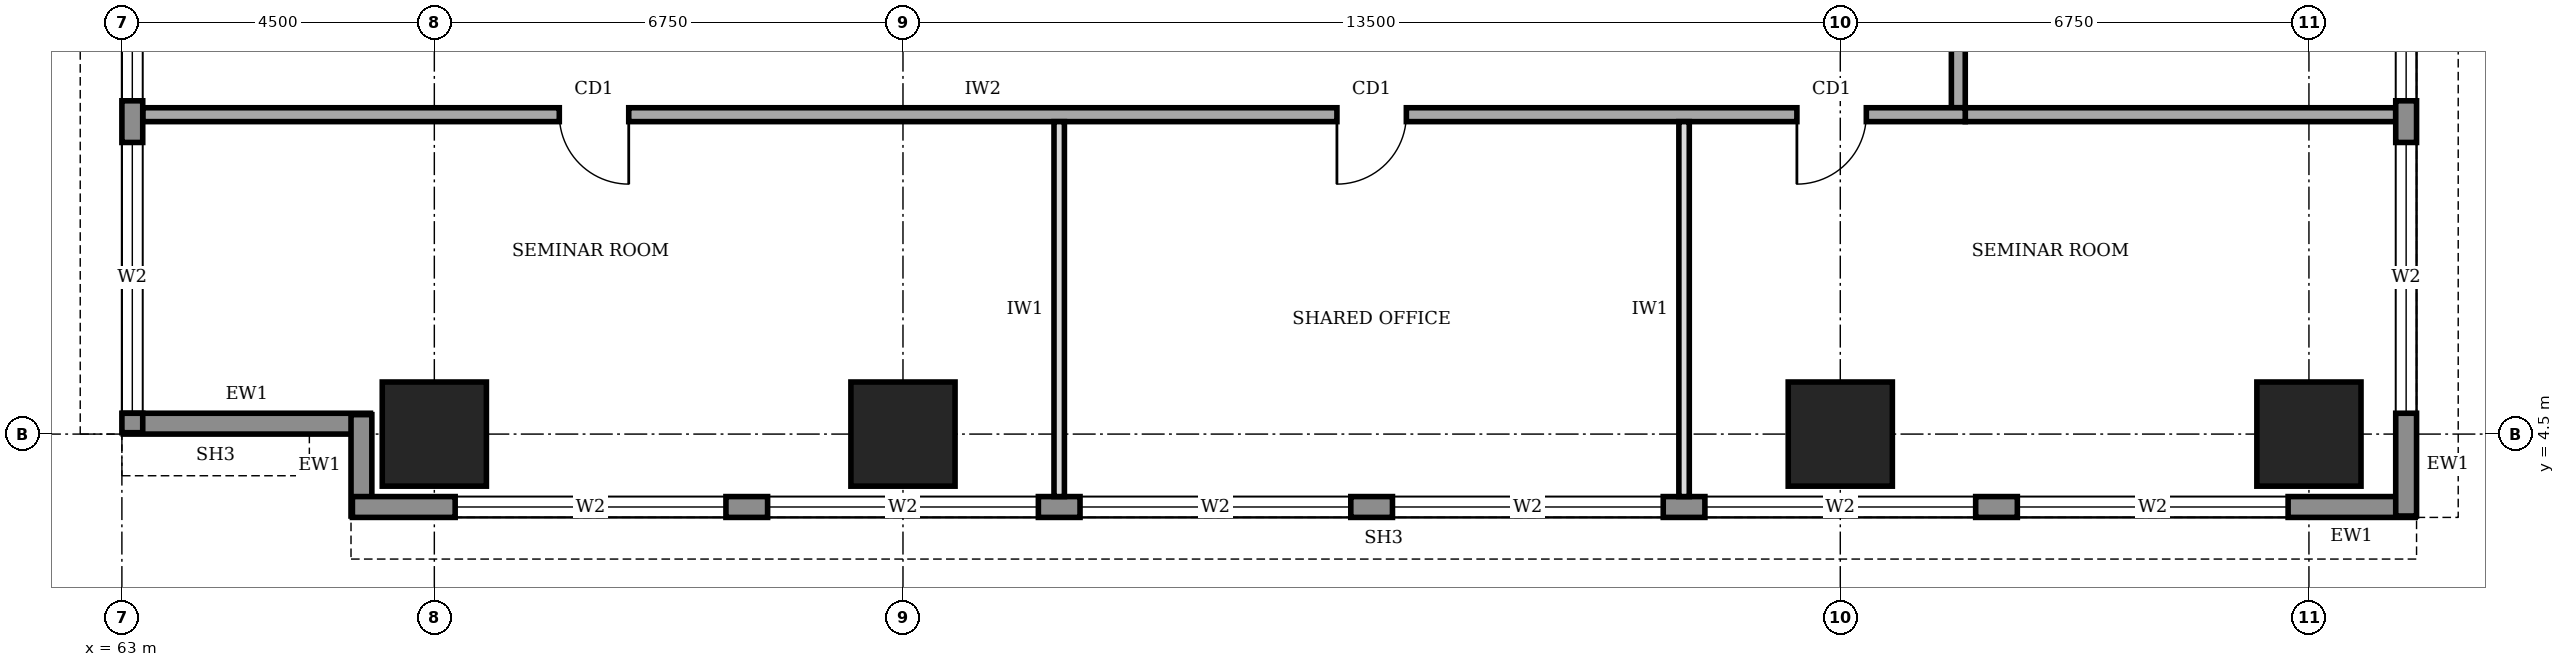
"""IFC4 building model, lengths in metres.
Left out: names, types, materials, properties, quantities, classifications, styles, units other than length and angle.
Written with IfcOpenShell. Run it as: python <this file> out.ifc"""

import sys

from ifc_helpers import new_model, si_unit, direction, frame, frame_2d, origin, origin_2d, place, context, subcontext, project, spatial, rectangle, extrude, element, fill, save


model = new_model("IFC4")
c1 = context("Model", 3, precision=1e-05, world=origin(), true_north=direction((0.0, 1.0)))
c2 = subcontext(c1, "Body", "Model", "MODEL_VIEW")
j1 = project(units=[si_unit("LENGTHUNIT", "METRE"), si_unit("PLANEANGLEUNIT", "RADIAN")], contexts=[c1])
p1 = place(None, origin())
s1 = spatial("IfcSite", under=j1, at=p1, CompositionType="ELEMENT")
p2 = place(p1, origin())
s2 = spatial("IfcBuilding", under=s1, at=p2, CompositionType="ELEMENT")
p3 = place(p2, frame((0.0, 0.0, 141.0)))
s3 = spatial("IfcBuildingStorey", under=s2, at=p3, CompositionType="ELEMENT", Elevation=141.0)
for number, where, z_axis, x_axis in (
    (1, (67.5, 4.5, 0.0), (0.0, 0.0, 1.0), (1.0, 0.0, 0.0)),
    (2, (74.25, 4.5, 0.0), (0.0, 0.0, 1.0), (1.0, 0.0, 0.0)),
    (3, (87.75, 4.5, 0.0), (0.0, 0.0, 1.0), (1.0, 0.0, 0.0)),
    (4, (94.5, 4.5, 0.0), (0.0, 0.0, 1.0), (1.0, 0.0, 0.0)),
):
    element("IfcColumn", number, at=place(p3, frame(where, z_axis=z_axis, x_axis=x_axis)), inside=s3, PredefinedType="COLUMN", context=c2, shape_type="SweptSolid", body=[
        extrude(rectangle(XDim=1.5, YDim=1.5, at=origin_2d()), origin(), (0.0, 0.0, 1.0), 4.0),
    ])
p4 = place(p3, frame((63.02, 4.65, 0.0), z_axis=(0.0, 0.0, 1.0), x_axis=(1.0, 0.0, 0.0)))
e5 = element("IfcWall", 5, at=p4, inside=s3, PredefinedType="STANDARD", context=c2, shape_type="SweptSolid", body=[
    extrude(rectangle(XDim=3.56, YDim=0.3, at=frame_2d((1.78, 0.0))), origin(), (0.0, 0.0, 1.0), 2.85),
])
p5 = place(p3, frame((66.45, 4.78, 0.0), z_axis=(0.0, 0.0, 1.0), x_axis=(0.0, -1.0, 0.0)))
e6 = element("IfcWall", 6, at=p5, inside=s3, PredefinedType="STANDARD", context=c2, shape_type="SweptSolid", body=[
    extrude(rectangle(XDim=1.46, YDim=0.3, at=frame_2d((0.73, 0.0))), origin(), (0.0, 0.0, 1.0), 3.75),
])
p6 = place(p3, frame((66.32, 3.45, 0.0), z_axis=(0.0, 0.0, 1.0), x_axis=(1.0, 0.0, 0.0)))
e7 = element("IfcWall", 7, at=p6, inside=s3, PredefinedType="STANDARD", context=c2, shape_type="SweptSolid", body=[
    extrude(rectangle(XDim=29.71, YDim=0.3, at=frame_2d((14.855, 0.0))), origin(), (0.0, 0.0, 1.0), 3.75),
])
p7 = place(p6, frame((1.48, 0.0, 0.6)))
e8 = element("IfcOpeningElement", 8, at=p7, cuts=e7, PredefinedType="OPENING", context=c2, shape_type="SweptSolid", body=[
    extrude(rectangle(XDim=3.9, YDim=2.6, at=frame_2d((1.95, 1.3))), frame((0.0, 0.16, 0.0), z_axis=(0.0, -1.0, 0.0), x_axis=(1.0, 0.0, 0.0)), (0.0, 0.0, 1.0), 0.32),
])
p8 = place(p6, frame((5.98, 0.0, 0.6)))
e9 = element("IfcOpeningElement", 9, at=p8, cuts=e7, PredefinedType="OPENING", context=c2, shape_type="SweptSolid", body=[
    extrude(rectangle(XDim=3.9, YDim=2.6, at=frame_2d((1.95, 1.3))), frame((0.0, 0.16, 0.0), z_axis=(0.0, -1.0, 0.0), x_axis=(1.0, 0.0, 0.0)), (0.0, 0.0, 1.0), 0.32),
])
p9 = place(p6, frame((10.48, 0.0, 0.6)))
e10 = element("IfcOpeningElement", 10, at=p9, cuts=e7, PredefinedType="OPENING", context=c2, shape_type="SweptSolid", body=[
    extrude(rectangle(XDim=3.9, YDim=2.6, at=frame_2d((1.95, 1.3))), frame((0.0, 0.16, 0.0), z_axis=(0.0, -1.0, 0.0), x_axis=(1.0, 0.0, 0.0)), (0.0, 0.0, 1.0), 0.32),
])
p10 = place(p6, frame((14.98, 0.0, 0.6)))
e11 = element("IfcOpeningElement", 11, at=p10, cuts=e7, PredefinedType="OPENING", context=c2, shape_type="SweptSolid", body=[
    extrude(rectangle(XDim=3.9, YDim=2.6, at=frame_2d((1.95, 1.3))), frame((0.0, 0.16, 0.0), z_axis=(0.0, -1.0, 0.0), x_axis=(1.0, 0.0, 0.0)), (0.0, 0.0, 1.0), 0.32),
])
p11 = place(p6, frame((19.48, 0.0, 0.6)))
e12 = element("IfcOpeningElement", 12, at=p11, cuts=e7, PredefinedType="OPENING", context=c2, shape_type="SweptSolid", body=[
    extrude(rectangle(XDim=3.9, YDim=2.6, at=frame_2d((1.95, 1.3))), frame((0.0, 0.16, 0.0), z_axis=(0.0, -1.0, 0.0), x_axis=(1.0, 0.0, 0.0)), (0.0, 0.0, 1.0), 0.32),
])
p12 = place(p6, frame((23.98, 0.0, 0.6)))
e13 = element("IfcOpeningElement", 13, at=p12, cuts=e7, PredefinedType="OPENING", context=c2, shape_type="SweptSolid", body=[
    extrude(rectangle(XDim=3.9, YDim=2.6, at=frame_2d((1.95, 1.3))), frame((0.0, 0.16, 0.0), z_axis=(0.0, -1.0, 0.0), x_axis=(1.0, 0.0, 0.0)), (0.0, 0.0, 1.0), 0.32),
])
p13 = place(p3, frame((95.9, 3.32, 0.0), z_axis=(0.0, 0.0, 1.0), x_axis=(0.0, 1.0, 0.0)))
e14 = element("IfcWall", 14, at=p13, inside=s3, PredefinedType="STANDARD", context=c2, shape_type="SweptSolid", body=[
    extrude(rectangle(XDim=33.86, YDim=0.3, at=frame_2d((16.93, 0.0))), origin(), (0.0, 0.0, 1.0), 3.75),
])
p14 = place(p13, frame((1.48, 0.0, 0.6)))
e15 = element("IfcOpeningElement", 15, at=p14, cuts=e14, PredefinedType="OPENING", context=c2, shape_type="SweptSolid", body=[
    extrude(rectangle(XDim=3.9, YDim=2.6, at=frame_2d((1.95, 1.3))), frame((0.0, 0.16, 0.0), z_axis=(0.0, -1.0, 0.0), x_axis=(1.0, 0.0, 0.0)), (0.0, 0.0, 1.0), 0.32),
])
p15 = place(p13, frame((5.98, 0.0, 0.6)))
e16 = element("IfcOpeningElement", 16, at=p15, cuts=e14, PredefinedType="OPENING", context=c2, shape_type="SweptSolid", body=[
    extrude(rectangle(XDim=3.9, YDim=2.6, at=frame_2d((1.95, 1.3))), frame((0.0, 0.16, 0.0), z_axis=(0.0, -1.0, 0.0), x_axis=(1.0, 0.0, 0.0)), (0.0, 0.0, 1.0), 0.32),
])
p16 = place(p13, frame((10.48, 0.0, 0.6)))
e17 = element("IfcOpeningElement", 17, at=p16, cuts=e14, PredefinedType="OPENING", context=c2, shape_type="SweptSolid", body=[
    extrude(rectangle(XDim=3.9, YDim=2.6, at=frame_2d((1.95, 1.3))), frame((0.0, 0.16, 0.0), z_axis=(0.0, -1.0, 0.0), x_axis=(1.0, 0.0, 0.0)), (0.0, 0.0, 1.0), 0.32),
])
p17 = place(p13, frame((14.98, 0.0, 0.6)))
e18 = element("IfcOpeningElement", 18, at=p17, cuts=e14, PredefinedType="OPENING", context=c2, shape_type="SweptSolid", body=[
    extrude(rectangle(XDim=3.9, YDim=2.6, at=frame_2d((1.95, 1.3))), frame((0.0, 0.16, 0.0), z_axis=(0.0, -1.0, 0.0), x_axis=(1.0, 0.0, 0.0)), (0.0, 0.0, 1.0), 0.32),
])
p18 = place(p13, frame((19.48, 0.0, 0.6)))
e19 = element("IfcOpeningElement", 19, at=p18, cuts=e14, PredefinedType="OPENING", context=c2, shape_type="SweptSolid", body=[
    extrude(rectangle(XDim=3.9, YDim=2.6, at=frame_2d((1.95, 1.3))), frame((0.0, 0.16, 0.0), z_axis=(0.0, -1.0, 0.0), x_axis=(1.0, 0.0, 0.0)), (0.0, 0.0, 1.0), 0.32),
])
p19 = place(p13, frame((23.98, 0.0, 0.6)))
e20 = element("IfcOpeningElement", 20, at=p19, cuts=e14, PredefinedType="OPENING", context=c2, shape_type="SweptSolid", body=[
    extrude(rectangle(XDim=3.9, YDim=2.6, at=frame_2d((1.95, 1.3))), frame((0.0, 0.16, 0.0), z_axis=(0.0, -1.0, 0.0), x_axis=(1.0, 0.0, 0.0)), (0.0, 0.0, 1.0), 0.32),
])
p20 = place(p13, frame((28.48, 0.0, 0.6)))
e21 = element("IfcOpeningElement", 21, at=p20, cuts=e14, PredefinedType="OPENING", context=c2, shape_type="SweptSolid", body=[
    extrude(rectangle(XDim=3.9, YDim=2.6, at=frame_2d((1.95, 1.3))), frame((0.0, 0.16, 0.0), z_axis=(0.0, -1.0, 0.0), x_axis=(1.0, 0.0, 0.0)), (0.0, 0.0, 1.0), 0.32),
])
p21 = place(p3, frame((63.15, 35.98, 0.0), z_axis=(0.0, 0.0, 1.0), x_axis=(0.0, -1.0, 0.0)))
e22 = element("IfcWall", 22, at=p21, inside=s3, PredefinedType="STANDARD", context=c2, shape_type="SweptSolid", body=[
    extrude(rectangle(XDim=31.46, YDim=0.3, at=frame_2d((15.73, 0.0))), origin(), (0.0, 0.0, 1.0), 3.75),
])
p22 = place(p21, frame((27.28, 0.0, 0.6)))
e23 = element("IfcOpeningElement", 23, at=p22, cuts=e22, PredefinedType="OPENING", context=c2, shape_type="SweptSolid", body=[
    extrude(rectangle(XDim=3.9, YDim=2.6, at=frame_2d((1.95, 1.3))), frame((0.0, 0.16, 0.0), z_axis=(0.0, -1.0, 0.0), x_axis=(1.0, 0.0, 0.0)), (0.0, 0.0, 1.0), 0.32),
])
p23 = place(p21, frame((22.78, 0.0, 0.6)))
e24 = element("IfcOpeningElement", 24, at=p23, cuts=e22, PredefinedType="OPENING", context=c2, shape_type="SweptSolid", body=[
    extrude(rectangle(XDim=3.9, YDim=2.6, at=frame_2d((1.95, 1.3))), frame((0.0, 0.16, 0.0), z_axis=(0.0, -1.0, 0.0), x_axis=(1.0, 0.0, 0.0)), (0.0, 0.0, 1.0), 0.32),
])
p24 = place(p21, frame((18.28, 0.0, 0.6)))
e25 = element("IfcOpeningElement", 25, at=p24, cuts=e22, PredefinedType="OPENING", context=c2, shape_type="SweptSolid", body=[
    extrude(rectangle(XDim=3.9, YDim=2.6, at=frame_2d((1.95, 1.3))), frame((0.0, 0.16, 0.0), z_axis=(0.0, -1.0, 0.0), x_axis=(1.0, 0.0, 0.0)), (0.0, 0.0, 1.0), 0.32),
])
p25 = place(p21, frame((13.78, 0.0, 0.6)))
e26 = element("IfcOpeningElement", 26, at=p25, cuts=e22, PredefinedType="OPENING", context=c2, shape_type="SweptSolid", body=[
    extrude(rectangle(XDim=3.9, YDim=2.6, at=frame_2d((1.95, 1.3))), frame((0.0, 0.16, 0.0), z_axis=(0.0, -1.0, 0.0), x_axis=(1.0, 0.0, 0.0)), (0.0, 0.0, 1.0), 0.32),
])
p26 = place(p21, frame((9.28, 0.0, 0.6)))
e27 = element("IfcOpeningElement", 27, at=p26, cuts=e22, PredefinedType="OPENING", context=c2, shape_type="SweptSolid", body=[
    extrude(rectangle(XDim=3.9, YDim=2.6, at=frame_2d((1.95, 1.3))), frame((0.0, 0.16, 0.0), z_axis=(0.0, -1.0, 0.0), x_axis=(1.0, 0.0, 0.0)), (0.0, 0.0, 1.0), 0.32),
])
p27 = place(p21, frame((4.78, 0.0, 0.6)))
e28 = element("IfcOpeningElement", 28, at=p27, cuts=e22, PredefinedType="OPENING", context=c2, shape_type="SweptSolid", body=[
    extrude(rectangle(XDim=3.9, YDim=2.6, at=frame_2d((1.95, 1.3))), frame((0.0, 0.16, 0.0), z_axis=(0.0, -1.0, 0.0), x_axis=(1.0, 0.0, 0.0)), (0.0, 0.0, 1.0), 0.32),
])
p28 = place(p3, frame((63.3, 9.1, 0.0), z_axis=(0.0, 0.0, 1.0), x_axis=(1.0, 0.0, 0.0)))
e29 = element("IfcWall", 29, at=p28, inside=s3, PredefinedType="SOLIDWALL", context=c2, shape_type="SweptSolid", body=[
    extrude(rectangle(XDim=26.25, YDim=0.2, at=frame_2d((13.125, 0.0))), origin(), (0.0, 0.0, 1.0), 3.75),
])
p29 = place(p28, frame((6.0, 0.0, 0.0)))
e30 = element("IfcOpeningElement", 30, at=p29, cuts=e29, PredefinedType="OPENING", context=c2, shape_type="SweptSolid", body=[
    extrude(rectangle(XDim=1.0, YDim=2.1, at=frame_2d((0.5, 1.05))), frame((0.0, 0.11, 0.0), z_axis=(0.0, -1.0, 0.0), x_axis=(1.0, 0.0, 0.0)), (0.0, 0.0, 1.0), 0.22),
])
p30 = place(p28, frame((17.2, 0.0, 0.0)))
e31 = element("IfcOpeningElement", 31, at=p30, cuts=e29, PredefinedType="OPENING", context=c2, shape_type="SweptSolid", body=[
    extrude(rectangle(XDim=1.0, YDim=2.1, at=frame_2d((0.5, 1.05))), frame((0.0, 0.11, 0.0), z_axis=(0.0, -1.0, 0.0), x_axis=(1.0, 0.0, 0.0)), (0.0, 0.0, 1.0), 0.22),
])
p31 = place(p28, frame((23.825, 0.0, 0.0)))
e32 = element("IfcOpeningElement", 32, at=p31, cuts=e29, PredefinedType="OPENING", context=c2, shape_type="SweptSolid", body=[
    extrude(rectangle(XDim=1.0, YDim=2.1, at=frame_2d((0.5, 1.05))), frame((0.0, 0.11, 0.0), z_axis=(0.0, -1.0, 0.0), x_axis=(1.0, 0.0, 0.0)), (0.0, 0.0, 1.0), 0.22),
])
p32 = place(p3, frame((89.45, 9.2, 0.0), z_axis=(0.0, 0.0, 1.0), x_axis=(0.0, 1.0, 0.0)))
e33 = element("IfcWall", 33, at=p32, inside=s3, PredefinedType="SOLIDWALL", context=c2, shape_type="SweptSolid", body=[
    extrude(rectangle(XDim=23.8, YDim=0.2, at=frame_2d((11.9, 0.0))), origin(), (0.0, 0.0, 1.0), 3.75),
])
p33 = place(p32, frame((1.55, 0.0, 0.0)))
e34 = element("IfcOpeningElement", 34, at=p33, cuts=e33, PredefinedType="OPENING", context=c2, shape_type="SweptSolid", body=[
    extrude(rectangle(XDim=1.0, YDim=2.1, at=frame_2d((0.5, 1.05))), frame((0.0, 0.11, 0.0), z_axis=(0.0, -1.0, 0.0), x_axis=(1.0, 0.0, 0.0)), (0.0, 0.0, 1.0), 0.22),
])
p34 = place(p32, frame((5.55, 0.0, 0.0)))
e35 = element("IfcOpeningElement", 35, at=p34, cuts=e33, PredefinedType="OPENING", context=c2, shape_type="SweptSolid", body=[
    extrude(rectangle(XDim=0.9, YDim=2.1, at=frame_2d((0.45, 1.05))), frame((0.0, 0.11, 0.0), z_axis=(0.0, -1.0, 0.0), x_axis=(1.0, 0.0, 0.0)), (0.0, 0.0, 1.0), 0.22),
])
p35 = place(p32, frame((10.35, 0.0, 0.0)))
e36 = element("IfcOpeningElement", 36, at=p35, cuts=e33, PredefinedType="OPENING", context=c2, shape_type="SweptSolid", body=[
    extrude(rectangle(XDim=0.9, YDim=2.1, at=frame_2d((0.45, 1.05))), frame((0.0, 0.11, 0.0), z_axis=(0.0, -1.0, 0.0), x_axis=(1.0, 0.0, 0.0)), (0.0, 0.0, 1.0), 0.22),
])
p36 = place(p32, frame((13.4, 0.0, 0.0)))
e37 = element("IfcOpeningElement", 37, at=p36, cuts=e33, PredefinedType="OPENING", context=c2, shape_type="SweptSolid", body=[
    extrude(rectangle(XDim=0.9, YDim=2.1, at=frame_2d((0.45, 1.05))), frame((0.0, 0.11, 0.0), z_axis=(0.0, -1.0, 0.0), x_axis=(1.0, 0.0, 0.0)), (0.0, 0.0, 1.0), 0.22),
])
p37 = place(p32, frame((16.3, 0.0, 0.0)))
e38 = element("IfcOpeningElement", 38, at=p37, cuts=e33, PredefinedType="OPENING", context=c2, shape_type="SweptSolid", body=[
    extrude(rectangle(XDim=1.0, YDim=2.1, at=frame_2d((0.5, 1.05))), frame((0.0, 0.11, 0.0), z_axis=(0.0, -1.0, 0.0), x_axis=(1.0, 0.0, 0.0)), (0.0, 0.0, 1.0), 0.22),
])
p38 = place(p32, frame((8.2, 0.0, 0.0)))
e39 = element("IfcOpeningElement", 39, at=p38, cuts=e33, PredefinedType="OPENING", context=c2, shape_type="SweptSolid", body=[
    extrude(rectangle(XDim=1.0, YDim=2.1, at=frame_2d((0.5, 1.05))), frame((0.0, 0.11, 0.0), z_axis=(0.0, -1.0, 0.0), x_axis=(1.0, 0.0, 0.0)), (0.0, 0.0, 1.0), 0.22),
])
p39 = place(p32, frame((20.3, 0.0, 0.0)))
e40 = element("IfcOpeningElement", 40, at=p39, cuts=e33, PredefinedType="OPENING", context=c2, shape_type="SweptSolid", body=[
    extrude(rectangle(XDim=1.0, YDim=2.1, at=frame_2d((0.5, 1.05))), frame((0.0, 0.11, 0.0), z_axis=(0.0, -1.0, 0.0), x_axis=(1.0, 0.0, 0.0)), (0.0, 0.0, 1.0), 0.22),
])
p40 = place(p3, frame((89.55, 9.1, 0.0), z_axis=(0.0, 0.0, 1.0), x_axis=(1.0, 0.0, 0.0)))
e41 = element("IfcWall", 41, at=p40, inside=s3, PredefinedType="SOLIDWALL", context=c2, shape_type="SweptSolid", body=[
    extrude(rectangle(XDim=6.2, YDim=0.2, at=frame_2d((3.1, 0.0))), origin(), (0.0, 0.0, 1.0), 3.75),
])
for number, where, z_axis, x_axis in (
    (42, (76.5, 3.6, 0.0), (0.0, 0.0, 1.0), (0.0, 1.0, 0.0)),
    (43, (85.5, 3.6, 0.0), (0.0, 0.0, 1.0), (0.0, 1.0, 0.0)),
):
    element("IfcWall", number, at=place(p3, frame(where, z_axis=z_axis, x_axis=x_axis)), inside=s3, PredefinedType="PARTITIONING", context=c2, shape_type="SweptSolid", body=[
        extrude(rectangle(XDim=5.4, YDim=0.15, at=frame_2d((2.7, 0.0))), origin(), (0.0, 0.0, 1.0), 3.75),
    ])
p41 = place(p7, origin())
e44 = element("IfcWindow", 44, at=p41, inside=s3, PartitioningType="SINGLE_PANEL", PredefinedType="WINDOW", context=c2, shape_type="SweptSolid", body=[
    extrude(rectangle(XDim=3.9, YDim=2.6, at=frame_2d((1.95, 1.3))), frame((0.0, 0.03, 0.0), z_axis=(0.0, -1.0, 0.0), x_axis=(1.0, 0.0, 0.0)), (0.0, 0.0, 1.0), 0.06),
])
fill(e8, e44)
p42 = place(p8, origin())
e45 = element("IfcWindow", 45, at=p42, inside=s3, PartitioningType="SINGLE_PANEL", PredefinedType="WINDOW", context=c2, shape_type="SweptSolid", body=[
    extrude(rectangle(XDim=3.9, YDim=2.6, at=frame_2d((1.95, 1.3))), frame((0.0, 0.03, 0.0), z_axis=(0.0, -1.0, 0.0), x_axis=(1.0, 0.0, 0.0)), (0.0, 0.0, 1.0), 0.06),
])
fill(e9, e45)
p43 = place(p9, origin())
e46 = element("IfcWindow", 46, at=p43, inside=s3, PartitioningType="SINGLE_PANEL", PredefinedType="WINDOW", context=c2, shape_type="SweptSolid", body=[
    extrude(rectangle(XDim=3.9, YDim=2.6, at=frame_2d((1.95, 1.3))), frame((0.0, 0.03, 0.0), z_axis=(0.0, -1.0, 0.0), x_axis=(1.0, 0.0, 0.0)), (0.0, 0.0, 1.0), 0.06),
])
fill(e10, e46)
p44 = place(p10, origin())
e47 = element("IfcWindow", 47, at=p44, inside=s3, PartitioningType="SINGLE_PANEL", PredefinedType="WINDOW", context=c2, shape_type="SweptSolid", body=[
    extrude(rectangle(XDim=3.9, YDim=2.6, at=frame_2d((1.95, 1.3))), frame((0.0, 0.03, 0.0), z_axis=(0.0, -1.0, 0.0), x_axis=(1.0, 0.0, 0.0)), (0.0, 0.0, 1.0), 0.06),
])
fill(e11, e47)
p45 = place(p11, origin())
e48 = element("IfcWindow", 48, at=p45, inside=s3, PartitioningType="SINGLE_PANEL", PredefinedType="WINDOW", context=c2, shape_type="SweptSolid", body=[
    extrude(rectangle(XDim=3.9, YDim=2.6, at=frame_2d((1.95, 1.3))), frame((0.0, 0.03, 0.0), z_axis=(0.0, -1.0, 0.0), x_axis=(1.0, 0.0, 0.0)), (0.0, 0.0, 1.0), 0.06),
])
fill(e12, e48)
p46 = place(p12, origin())
e49 = element("IfcWindow", 49, at=p46, inside=s3, PartitioningType="SINGLE_PANEL", PredefinedType="WINDOW", context=c2, shape_type="SweptSolid", body=[
    extrude(rectangle(XDim=3.9, YDim=2.6, at=frame_2d((1.95, 1.3))), frame((0.0, 0.03, 0.0), z_axis=(0.0, -1.0, 0.0), x_axis=(1.0, 0.0, 0.0)), (0.0, 0.0, 1.0), 0.06),
])
fill(e13, e49)
p47 = place(p14, origin())
e50 = element("IfcWindow", 50, at=p47, inside=s3, PartitioningType="SINGLE_PANEL", PredefinedType="WINDOW", context=c2, shape_type="SweptSolid", body=[
    extrude(rectangle(XDim=3.9, YDim=2.6, at=frame_2d((1.95, 1.3))), frame((0.0, 0.03, 0.0), z_axis=(0.0, -1.0, 0.0), x_axis=(1.0, 0.0, 0.0)), (0.0, 0.0, 1.0), 0.06),
])
fill(e15, e50)
p48 = place(p15, origin())
e51 = element("IfcWindow", 51, at=p48, inside=s3, PartitioningType="SINGLE_PANEL", PredefinedType="WINDOW", context=c2, shape_type="SweptSolid", body=[
    extrude(rectangle(XDim=3.9, YDim=2.6, at=frame_2d((1.95, 1.3))), frame((0.0, 0.03, 0.0), z_axis=(0.0, -1.0, 0.0), x_axis=(1.0, 0.0, 0.0)), (0.0, 0.0, 1.0), 0.06),
])
fill(e16, e51)
p49 = place(p22, origin())
e52 = element("IfcWindow", 52, at=p49, inside=s3, PartitioningType="SINGLE_PANEL", PredefinedType="WINDOW", context=c2, shape_type="SweptSolid", body=[
    extrude(rectangle(XDim=3.9, YDim=2.6, at=frame_2d((1.95, 1.3))), frame((0.0, 0.03, 0.0), z_axis=(0.0, -1.0, 0.0), x_axis=(1.0, 0.0, 0.0)), (0.0, 0.0, 1.0), 0.06),
])
fill(e23, e52)
p50 = place(p23, origin())
e53 = element("IfcWindow", 53, at=p50, inside=s3, PartitioningType="SINGLE_PANEL", PredefinedType="WINDOW", context=c2, shape_type="SweptSolid", body=[
    extrude(rectangle(XDim=3.9, YDim=2.6, at=frame_2d((1.95, 1.3))), frame((0.0, 0.03, 0.0), z_axis=(0.0, -1.0, 0.0), x_axis=(1.0, 0.0, 0.0)), (0.0, 0.0, 1.0), 0.06),
])
fill(e24, e53)
p51 = place(p29, frame((1.0, 0.0, 0.0), z_axis=(0.0, 0.0, 1.0), x_axis=(-1.0, 0.0, 0.0)))
e54 = element("IfcDoor", 54, at=p51, inside=s3, OperationType="SINGLE_SWING_LEFT", PredefinedType="DOOR", context=c2, shape_type="SweptSolid", body=[
    extrude(rectangle(XDim=1.0, YDim=2.1, at=frame_2d((0.5, 1.05))), frame((0.0, 0.025, 0.0), z_axis=(0.0, -1.0, 0.0), x_axis=(1.0, 0.0, 0.0)), (0.0, 0.0, 1.0), 0.05),
])
fill(e30, e54)
p52 = place(p30, frame((1.0, 0.0, 0.0), z_axis=(0.0, 0.0, 1.0), x_axis=(-1.0, 0.0, 0.0)))
e55 = element("IfcDoor", 55, at=p52, inside=s3, OperationType="SINGLE_SWING_RIGHT", PredefinedType="DOOR", context=c2, shape_type="SweptSolid", body=[
    extrude(rectangle(XDim=1.0, YDim=2.1, at=frame_2d((0.5, 1.05))), frame((0.0, 0.025, 0.0), z_axis=(0.0, -1.0, 0.0), x_axis=(1.0, 0.0, 0.0)), (0.0, 0.0, 1.0), 0.05),
])
fill(e31, e55)
p53 = place(p31, frame((1.0, 0.0, 0.0), z_axis=(0.0, 0.0, 1.0), x_axis=(-1.0, 0.0, 0.0)))
e56 = element("IfcDoor", 56, at=p53, inside=s3, OperationType="SINGLE_SWING_RIGHT", PredefinedType="DOOR", context=c2, shape_type="SweptSolid", body=[
    extrude(rectangle(XDim=1.0, YDim=2.1, at=frame_2d((0.5, 1.05))), frame((0.0, 0.025, 0.0), z_axis=(0.0, -1.0, 0.0), x_axis=(1.0, 0.0, 0.0)), (0.0, 0.0, 1.0), 0.05),
])
fill(e32, e56)
save(model, sys.argv[1])
